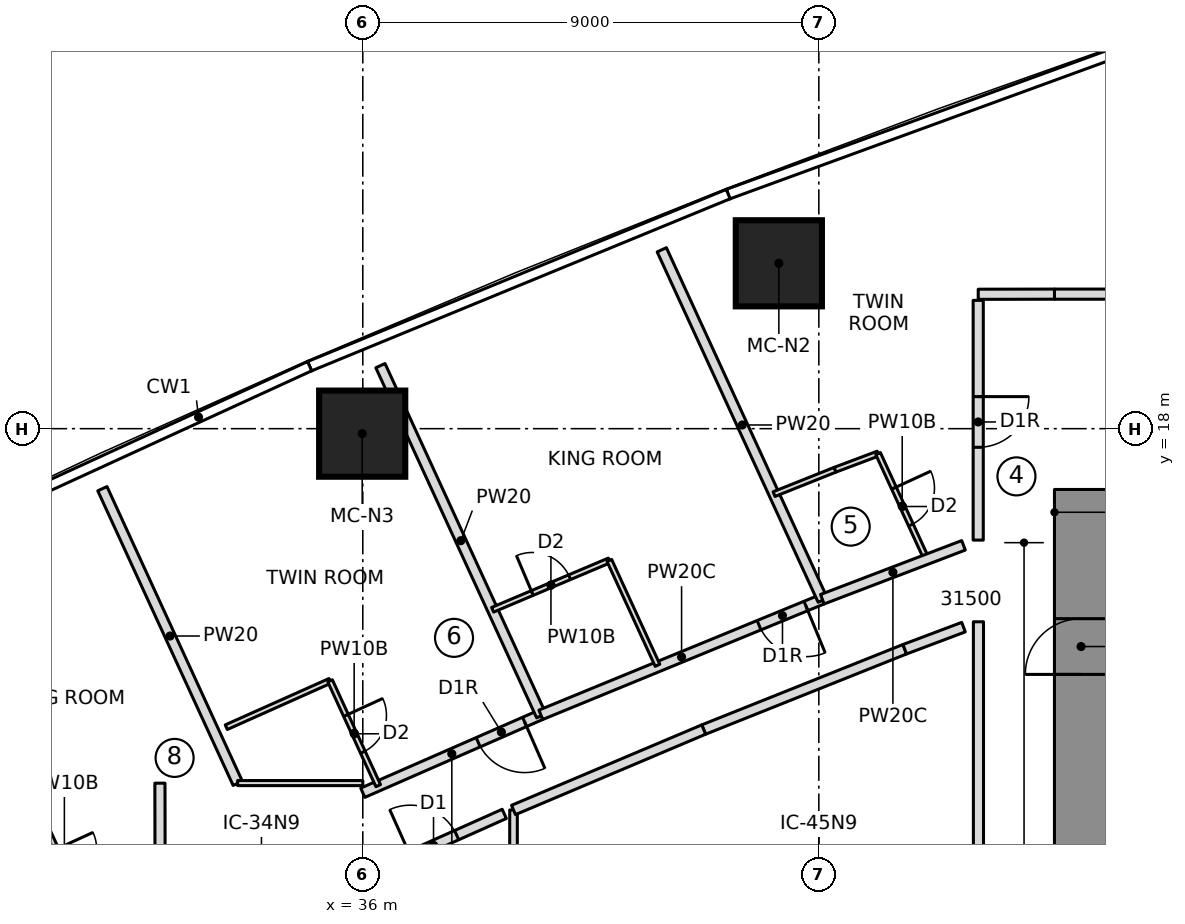
"""IFC4 building model, lengths in metres.
Left out: names, types, materials, properties, quantities, classifications, styles, units other than length and angle.
Written with IfcOpenShell. Run it as: python <this file> out.ifc"""

import sys

from ifc_helpers import new_model, si_unit, direction, frame, frame_2d, origin, origin_2d, place, context, subcontext, project, spatial, rectangle, extrude, element, fill, save


model = new_model("IFC4")
c1 = context("Model", 3, precision=1e-05, world=origin(), true_north=direction((0.0, 1.0)))
c2 = subcontext(c1, "Body", "Model", "MODEL_VIEW")
j1 = project(units=[si_unit("LENGTHUNIT", "METRE"), si_unit("PLANEANGLEUNIT", "RADIAN")], contexts=[c1])
p1 = place(None, origin())
s1 = spatial("IfcSite", under=j1, at=p1, CompositionType="ELEMENT")
p2 = place(p1, origin())
s2 = spatial("IfcBuilding", under=s1, at=p2, CompositionType="ELEMENT")
p3 = place(p2, frame((0.0, 0.0, 102.65)))
s3 = spatial("IfcBuildingStorey", under=s2, at=p3, CompositionType="ELEMENT", Elevation=102.65)
p4 = place(p3, frame((50.175, 6.65, 0.0), z_axis=(0.0, 0.0, 1.0), x_axis=(0.0, 1.0, 0.0)))
e1 = element("IfcWall", 1, at=p4, inside=s3, PredefinedType="SHEAR", context=c2, shape_type="SweptSolid", body=[
    extrude(rectangle(XDim=10.15, YDim=1.05, at=frame_2d((5.075, 0.0))), origin(), (0.0, 0.0, 1.0), 3.55),
])
p5 = place(p4, frame((6.5, 0.0, 0.0)))
e2 = element("IfcOpeningElement", 2, at=p5, cuts=e1, PredefinedType="OPENING", context=c2, shape_type="SweptSolid", body=[
    extrude(rectangle(XDim=1.1, YDim=2.1, at=frame_2d((0.55, 1.05))), frame((0.0, 0.535, 0.0), z_axis=(0.0, -1.0, 0.0), x_axis=(1.0, 0.0, 0.0)), (0.0, 0.0, 1.0), 1.07),
])
for number, where, z_axis, x_axis in (
    (3, (44.211, 21.264, 0.0), (0.0, 0.0, 1.0), (1.0, 0.0, 0.0)),
    (4, (35.988, 17.902, 0.0), (0.0, 0.0, 1.0), (1.0, 0.0, 0.0)),
):
    element("IfcColumn", number, at=place(p3, frame(where, z_axis=z_axis, x_axis=x_axis)), inside=s3, PredefinedType="COLUMN", context=c2, shape_type="SweptSolid", body=[
        extrude(rectangle(XDim=1.7, YDim=1.7, at=origin_2d()), origin(), (0.0, 0.0, 1.0), 3.55),
    ])
p6 = place(p3, frame((29.635, 10.38, 0.0), z_axis=(0.0, 0.0, 1.0), x_axis=(0.417466676952, -0.908692232626, 0.0)))
e5 = element("IfcWall", 5, at=p6, inside=s3, PredefinedType="PARTITIONING", context=c2, shape_type="SweptSolid", body=[
    extrude(rectangle(XDim=2.277, YDim=0.1, at=frame_2d((1.139, 0.0))), origin(), (0.0, 0.0, 1.0), 3.25),
])
p7 = place(p6, frame((0.75, 0.0, 0.0)))
e6 = element("IfcOpeningElement", 6, at=p7, cuts=e5, PredefinedType="OPENING", context=c2, shape_type="SweptSolid", body=[
    extrude(rectangle(XDim=0.8, YDim=2.1, at=frame_2d((0.4, 1.05))), frame((0.0, 0.06, 0.0), z_axis=(0.0, -1.0, 0.0), x_axis=(1.0, 0.0, 0.0)), (0.0, 0.0, 1.0), 0.12),
])
p8 = place(p3, frame((33.532, 11.0, 0.0), z_axis=(0.0, 0.0, 1.0), x_axis=(-0.417441426461, 0.908703832651, 0.0)))
e7 = element("IfcWall", 7, at=p8, inside=s3, PredefinedType="PARTITIONING", context=c2, shape_type="SweptSolid", body=[
    extrude(rectangle(XDim=6.399, YDim=0.2, at=frame_2d((3.2, 0.0))), origin(), (0.0, 0.0, 1.0), 3.25),
])
p9 = place(p3, frame((39.514, 12.353, 0.0), z_axis=(0.0, 0.0, 1.0), x_axis=(-0.916085742373, -0.400982434305, 0.0)))
e8 = element("IfcWall", 8, at=p9, inside=s3, PredefinedType="PARTITIONING", context=c2, shape_type="SweptSolid", body=[
    extrude(rectangle(XDim=3.836, YDim=0.2, at=frame_2d((1.918, 0.0))), origin(), (0.0, 0.0, 1.0), 3.25),
])
p10 = place(p9, frame((0.35, 0.0, 0.0)))
e9 = element("IfcOpeningElement", 9, at=p10, cuts=e8, PredefinedType="OPENING", context=c2, shape_type="SweptSolid", body=[
    extrude(rectangle(XDim=1.0, YDim=2.1, at=frame_2d((0.5, 1.05))), frame((0.0, 0.11, 0.0), z_axis=(0.0, -1.0, 0.0), x_axis=(1.0, 0.0, 0.0)), (0.0, 0.0, 1.0), 0.22),
])
p11 = place(p3, frame((33.306, 12.108, 0.0), z_axis=(0.0, 0.0, 1.0), x_axis=(0.913060453705, 0.407824236504, 0.0)))
e10 = element("IfcWall", 10, at=p11, inside=s3, PredefinedType="PARTITIONING", context=c2, shape_type="SweptSolid", body=[
    extrude(rectangle(XDim=2.243, YDim=0.1, at=frame_2d((1.122, 0.0))), origin(), (0.0, 0.0, 1.0), 3.25),
])
p12 = place(p3, frame((35.354, 13.023, 0.0), z_axis=(0.0, 0.0, 1.0), x_axis=(0.41750734959, -0.908673545911, 0.0)))
e11 = element("IfcWall", 11, at=p12, inside=s3, PredefinedType="PARTITIONING", context=c2, shape_type="SweptSolid", body=[
    extrude(rectangle(XDim=2.277, YDim=0.1, at=frame_2d((1.139, 0.0))), origin(), (0.0, 0.0, 1.0), 3.25),
])
p13 = place(p12, frame((0.75, 0.0, 0.0)))
e12 = element("IfcOpeningElement", 12, at=p13, cuts=e11, PredefinedType="OPENING", context=c2, shape_type="SweptSolid", body=[
    extrude(rectangle(XDim=0.8, YDim=2.1, at=frame_2d((0.4, 1.05))), frame((0.0, 0.06, 0.0), z_axis=(0.0, -1.0, 0.0), x_axis=(1.0, 0.0, 0.0)), (0.0, 0.0, 1.0), 0.12),
])
p14 = place(p3, frame((39.522, 12.334, 0.0), z_axis=(0.0, 0.0, 1.0), x_axis=(-0.417442847913, 0.908703179661, 0.0)))
e13 = element("IfcWall", 13, at=p14, inside=s3, PredefinedType="PARTITIONING", context=c2, shape_type="SweptSolid", body=[
    extrude(rectangle(XDim=7.604, YDim=0.2, at=frame_2d((3.802, 0.0))), origin(), (0.0, 0.0, 1.0), 3.25),
])
p15 = place(p3, frame((45.069, 14.634, 0.0), z_axis=(0.0, 0.0, 1.0), x_axis=(-0.925062421694, -0.379815107611, 0.0)))
e14 = element("IfcWall", 14, at=p15, inside=s3, PredefinedType="PARTITIONING", context=c2, shape_type="SweptSolid", body=[
    extrude(rectangle(XDim=6.005, YDim=0.2, at=frame_2d((3.002, 0.0))), origin(), (0.0, 0.0, 1.0), 3.25),
])
p16 = place(p15, frame((0.35, 0.0, 0.0)))
e15 = element("IfcOpeningElement", 15, at=p16, cuts=e14, PredefinedType="OPENING", context=c2, shape_type="SweptSolid", body=[
    extrude(rectangle(XDim=1.0, YDim=2.1, at=frame_2d((0.5, 1.05))), frame((0.0, 0.11, 0.0), z_axis=(0.0, -1.0, 0.0), x_axis=(1.0, 0.0, 0.0)), (0.0, 0.0, 1.0), 0.22),
])
p17 = place(p3, frame((38.562, 14.426, 0.0), z_axis=(0.0, 0.0, 1.0), x_axis=(0.921042675983, 0.38946166566, 0.0)))
e16 = element("IfcWall", 16, at=p17, inside=s3, PredefinedType="PARTITIONING", context=c2, shape_type="SweptSolid", body=[
    extrude(rectangle(XDim=2.501, YDim=0.1, at=frame_2d((1.25, 0.0))), origin(), (0.0, 0.0, 1.0), 3.25),
])
p18 = place(p17, frame((0.85, 0.0, 0.0)))
e17 = element("IfcOpeningElement", 17, at=p18, cuts=e16, PredefinedType="OPENING", context=c2, shape_type="SweptSolid", body=[
    extrude(rectangle(XDim=0.8, YDim=2.1, at=frame_2d((0.4, 1.05))), frame((0.0, 0.06, 0.0), z_axis=(0.0, -1.0, 0.0), x_axis=(1.0, 0.0, 0.0)), (0.0, 0.0, 1.0), 0.12),
])
p19 = place(p3, frame((40.865, 15.4, 0.0), z_axis=(0.0, 0.0, 1.0), x_axis=(0.417433204355, -0.908707609686, 0.0)))
e18 = element("IfcWall", 18, at=p19, inside=s3, PredefinedType="PARTITIONING", context=c2, shape_type="SweptSolid", body=[
    extrude(rectangle(XDim=2.278, YDim=0.1, at=frame_2d((1.139, 0.0))), origin(), (0.0, 0.0, 1.0), 3.25),
])
p20 = place(p3, frame((45.077, 14.615, 0.0), z_axis=(0.0, 0.0, 1.0), x_axis=(-0.417427858403, 0.908710065438, 0.0)))
e19 = element("IfcWall", 19, at=p20, inside=s3, PredefinedType="PARTITIONING", context=c2, shape_type="SweptSolid", body=[
    extrude(rectangle(XDim=7.61, YDim=0.2, at=frame_2d((3.805, 0.0))), origin(), (0.0, 0.0, 1.0), 3.25),
])
p21 = place(p3, frame((44.116, 16.708, 0.0), z_axis=(0.0, 0.0, 1.0), x_axis=(0.928593389657, 0.371098796393, 0.0)))
e20 = element("IfcWall", 20, at=p21, inside=s3, PredefinedType="PARTITIONING", context=c2, shape_type="SweptSolid", body=[
    extrude(rectangle(XDim=1.298, YDim=0.1, at=frame_2d((0.649, 0.0))), origin(), (0.0, 0.0, 1.0), 3.25),
])
p22 = place(p3, frame((45.321, 17.19, 0.0), z_axis=(0.0, 0.0, 1.0), x_axis=(0.935885332459, 0.352304760808, 0.0)))
e21 = element("IfcWall", 21, at=p22, inside=s3, PredefinedType="PARTITIONING", context=c2, shape_type="SweptSolid", body=[
    extrude(rectangle(XDim=0.906, YDim=0.1, at=frame_2d((0.453, 0.0))), origin(), (0.0, 0.0, 1.0), 3.25),
])
p23 = place(p3, frame((46.169, 17.509, 0.0), z_axis=(0.0, 0.0, 1.0), x_axis=(0.417409478396, -0.90871850831, 0.0)))
e22 = element("IfcWall", 22, at=p23, inside=s3, PredefinedType="PARTITIONING", context=c2, shape_type="SweptSolid", body=[
    extrude(rectangle(XDim=2.283, YDim=0.1, at=frame_2d((1.142, 0.0))), origin(), (0.0, 0.0, 1.0), 3.25),
])
p24 = place(p23, frame((0.75, 0.0, 0.0)))
e23 = element("IfcOpeningElement", 23, at=p24, cuts=e22, PredefinedType="OPENING", context=c2, shape_type="SweptSolid", body=[
    extrude(rectangle(XDim=0.8, YDim=2.1, at=frame_2d((0.4, 1.05))), frame((0.0, 0.06, 0.0), z_axis=(0.0, -1.0, 0.0), x_axis=(1.0, 0.0, 0.0)), (0.0, 0.0, 1.0), 0.12),
])
p25 = place(p3, frame((36.0, 9.15, 0.0), z_axis=(0.0, 0.0, 1.0), x_axis=(0.913029587861, 0.407893333716, 0.0)))
e24 = element("IfcWall", 24, at=p25, inside=s3, PredefinedType="PARTITIONING", context=c2, shape_type="SweptSolid", body=[
    extrude(rectangle(XDim=3.058, YDim=0.2, at=frame_2d((1.529, 0.0))), origin(), (0.0, 0.0, 1.0), 3.25),
])
p26 = place(p25, frame((1.029, 0.0, 0.0)))
e25 = element("IfcOpeningElement", 25, at=p26, cuts=e24, PredefinedType="OPENING", context=c2, shape_type="SweptSolid", body=[
    extrude(rectangle(XDim=1.0, YDim=2.1, at=frame_2d((0.5, 1.05))), frame((0.0, 0.11, 0.0), z_axis=(0.0, -1.0, 0.0), x_axis=(1.0, 0.0, 0.0)), (0.0, 0.0, 1.0), 0.22),
])
p27 = place(p3, frame((38.975, -10.474, 0.0), z_axis=(0.0, 0.0, 1.0), x_axis=(0.0, 1.0, 0.0)))
e26 = element("IfcWall", 26, at=p27, inside=s3, PredefinedType="PARTITIONING", context=c2, shape_type="SweptSolid", body=[
    extrude(rectangle(XDim=20.949, YDim=0.15, at=frame_2d((10.474, 0.0))), origin(), (0.0, 0.0, 1.0), 3.25),
])
p28 = place(p3, frame((42.728, 12.062, 0.0), z_axis=(0.0, 0.0, 1.0), x_axis=(0.928638161177, 0.370986745864, 0.0)))
e27 = element("IfcWall", 27, at=p28, inside=s3, PredefinedType="PARTITIONING", context=c2, shape_type="SweptSolid", body=[
    extrude(rectangle(XDim=4.273, YDim=0.2, at=frame_2d((2.136, 0.0))), origin(), (0.0, 0.0, 1.0), 3.25),
])
p29 = place(p3, frame((38.975, 10.474, 0.0), z_axis=(0.0, 0.0, 1.0), x_axis=(0.921030909625, 0.389489490891, 0.0)))
e28 = element("IfcWall", 28, at=p29, inside=s3, PredefinedType="PARTITIONING", context=c2, shape_type="SweptSolid", body=[
    extrude(rectangle(XDim=4.075, YDim=0.2, at=frame_2d((2.038, 0.0))), origin(), (0.0, 0.0, 1.0), 3.25),
])
p30 = place(p3, frame((54.625, 20.655, 0.0), z_axis=(0.0, 0.0, 1.0), x_axis=(-1.0, 0.0, 0.0)))
e29 = element("IfcWall", 29, at=p30, inside=s3, PredefinedType="PARTITIONING", context=c2, shape_type="SweptSolid", body=[
    extrude(rectangle(XDim=4.976, YDim=0.2, at=frame_2d((2.488, 0.0))), origin(), (0.0, 0.0, 1.0), 3.25),
])
p31 = place(p30, frame((1.988, 0.0, 0.0)))
e30 = element("IfcOpeningElement", 30, at=p31, cuts=e29, PredefinedType="OPENING", context=c2, shape_type="SweptSolid", body=[
    extrude(rectangle(XDim=1.5, YDim=2.1, at=frame_2d((0.75, 1.05))), frame((0.0, 0.11, 0.0), z_axis=(0.0, -1.0, 0.0), x_axis=(1.0, 0.0, 0.0)), (0.0, 0.0, 1.0), 0.22),
])
p32 = place(p3, frame((36.0, 11.005, 0.0), z_axis=(0.0, 0.0, 1.0), x_axis=(-1.0, 0.0, 0.0)))
e31 = element("IfcWall", 31, at=p32, inside=s3, PredefinedType="PARTITIONING", context=c2, shape_type="SweptSolid", body=[
    extrude(rectangle(XDim=2.47, YDim=0.1, at=frame_2d((1.235, 0.0))), origin(), (0.0, 0.0, 1.0), 3.25),
])
p33 = place(p3, frame((47.855, 15.698, 0.0), z_axis=(0.0, 0.0, 1.0), x_axis=(-0.934199537442, -0.35675092746, 0.0)))
e32 = element("IfcWall", 32, at=p33, inside=s3, PredefinedType="PARTITIONING", context=c2, shape_type="SweptSolid", body=[
    extrude(rectangle(XDim=2.982, YDim=0.2, at=frame_2d((1.491, 0.0))), origin(), (0.0, 0.0, 1.0), 3.25),
])
p34 = place(p3, frame((46.696, 13.647, 0.0), z_axis=(0.0, 0.0, 1.0), x_axis=(0.935907269358, 0.352246480696, 0.0)))
e33 = element("IfcWall", 33, at=p34, inside=s3, PredefinedType="PARTITIONING", context=c2, shape_type="SweptSolid", body=[
    extrude(rectangle(XDim=1.239, YDim=0.2, at=frame_2d((0.619, 0.0))), origin(), (0.0, 0.0, 1.0), 3.25),
])
p35 = place(p3, frame((48.15, 14.189, 0.0), z_axis=(0.0, 0.0, 1.0), x_axis=(0.0, -1.0, 0.0)))
e34 = element("IfcWall", 34, at=p35, inside=s3, PredefinedType="PARTITIONING", context=c2, shape_type="SweptSolid", body=[
    extrude(rectangle(XDim=28.377, YDim=0.2, at=frame_2d((14.189, 0.0))), origin(), (0.0, 0.0, 1.0), 3.25),
])
p36 = place(p3, frame((31.997, 11.003, 0.0), z_axis=(0.0, 0.0, 1.0), x_axis=(0.001683296882, -0.999998583255, 0.0)))
e35 = element("IfcWall", 35, at=p36, inside=s3, PredefinedType="PARTITIONING", context=c2, shape_type="SweptSolid", body=[
    extrude(rectangle(XDim=2.031, YDim=0.2, at=frame_2d((1.015, 0.0))), origin(), (0.0, 0.0, 1.0), 3.25),
])
p37 = place(p3, frame((49.65, 20.655, 0.0), z_axis=(0.0, 0.0, 1.0), x_axis=(-0.999998406651, -0.001785131852, 0.0)))
e36 = element("IfcWall", 36, at=p37, inside=s3, PredefinedType="PARTITIONING", context=c2, shape_type="SweptSolid", body=[
    extrude(rectangle(XDim=1.504, YDim=0.2, at=frame_2d((0.752, 0.0))), origin(), (0.0, 0.0, 1.0), 3.25),
])
p38 = place(p3, frame((48.146, 20.532, 0.0), z_axis=(0.0, 0.0, 1.0), x_axis=(-5.1594263e-05, -0.999999998669, 0.0)))
e37 = element("IfcWall", 37, at=p38, inside=s3, PredefinedType="PARTITIONING", context=c2, shape_type="SweptSolid", body=[
    extrude(rectangle(XDim=4.732, YDim=0.2, at=frame_2d((2.366, 0.0))), origin(), (0.0, 0.0, 1.0), 3.25),
])
p39 = place(p38, frame((1.9, 0.0, 0.0)))
e38 = element("IfcOpeningElement", 38, at=p39, cuts=e37, PredefinedType="OPENING", context=c2, shape_type="SweptSolid", body=[
    extrude(rectangle(XDim=1.0, YDim=2.1, at=frame_2d((0.5, 1.05))), frame((0.0, 0.11, 0.0), z_axis=(0.0, -1.0, 0.0), x_axis=(1.0, 0.0, 0.0)), (0.0, 0.0, 1.0), 0.22),
])
p40 = place(p13, origin())
e39 = element("IfcDoor", 39, at=p40, inside=s3, OperationType="SINGLE_SWING_LEFT", PredefinedType="DOOR", context=c2, shape_type="SweptSolid", body=[
    extrude(rectangle(XDim=0.8, YDim=2.1, at=frame_2d((0.4, 1.05))), frame((0.0, 0.025, 0.0), z_axis=(0.0, -1.0, 0.0), x_axis=(1.0, 0.0, 0.0)), (0.0, 0.0, 1.0), 0.05),
])
fill(e12, e39)
p41 = place(p10, origin())
e40 = element("IfcDoor", 40, at=p41, inside=s3, OperationType="SINGLE_SWING_RIGHT", PredefinedType="DOOR", context=c2, shape_type="SweptSolid", body=[
    extrude(rectangle(XDim=1.0, YDim=2.1, at=frame_2d((0.5, 1.05))), frame((0.0, 0.025, 0.0), z_axis=(0.0, -1.0, 0.0), x_axis=(1.0, 0.0, 0.0)), (0.0, 0.0, 1.0), 0.05),
])
fill(e9, e40)
p42 = place(p18, origin())
e41 = element("IfcDoor", 41, at=p42, inside=s3, OperationType="SINGLE_SWING_LEFT", PredefinedType="DOOR", context=c2, shape_type="SweptSolid", body=[
    extrude(rectangle(XDim=0.8, YDim=2.1, at=frame_2d((0.4, 1.05))), frame((0.0, 0.025, 0.0), z_axis=(0.0, -1.0, 0.0), x_axis=(1.0, 0.0, 0.0)), (0.0, 0.0, 1.0), 0.05),
])
fill(e17, e41)
p43 = place(p16, origin())
e42 = element("IfcDoor", 42, at=p43, inside=s3, OperationType="SINGLE_SWING_RIGHT", PredefinedType="DOOR", context=c2, shape_type="SweptSolid", body=[
    extrude(rectangle(XDim=1.0, YDim=2.1, at=frame_2d((0.5, 1.05))), frame((0.0, 0.025, 0.0), z_axis=(0.0, -1.0, 0.0), x_axis=(1.0, 0.0, 0.0)), (0.0, 0.0, 1.0), 0.05),
])
fill(e15, e42)
p44 = place(p24, origin())
e43 = element("IfcDoor", 43, at=p44, inside=s3, OperationType="SINGLE_SWING_LEFT", PredefinedType="DOOR", context=c2, shape_type="SweptSolid", body=[
    extrude(rectangle(XDim=0.8, YDim=2.1, at=frame_2d((0.4, 1.05))), frame((0.0, 0.025, 0.0), z_axis=(0.0, -1.0, 0.0), x_axis=(1.0, 0.0, 0.0)), (0.0, 0.0, 1.0), 0.05),
])
fill(e23, e43)
p45 = place(p26, origin())
e44 = element("IfcDoor", 44, at=p45, inside=s3, OperationType="SINGLE_SWING_LEFT", PredefinedType="DOOR", context=c2, shape_type="SweptSolid", body=[
    extrude(rectangle(XDim=1.0, YDim=2.1, at=frame_2d((0.5, 1.05))), frame((0.0, 0.025, 0.0), z_axis=(0.0, -1.0, 0.0), x_axis=(1.0, 0.0, 0.0)), (0.0, 0.0, 1.0), 0.05),
])
fill(e25, e44)
p46 = place(p39, origin())
e45 = element("IfcDoor", 45, at=p46, inside=s3, OperationType="SINGLE_SWING_RIGHT", PredefinedType="DOOR", context=c2, shape_type="SweptSolid", body=[
    extrude(rectangle(XDim=1.0, YDim=2.1, at=frame_2d((0.5, 1.05))), frame((0.0, 0.025, 0.0), z_axis=(0.0, -1.0, 0.0), x_axis=(1.0, 0.0, 0.0)), (0.0, 0.0, 1.0), 0.05),
])
fill(e38, e45)
p47 = place(p5, origin())
e46 = element("IfcDoor", 46, at=p47, inside=s3, OperationType="SINGLE_SWING_RIGHT", PredefinedType="DOOR", context=c2, shape_type="SweptSolid", body=[
    extrude(rectangle(XDim=1.1, YDim=2.1, at=frame_2d((0.55, 1.05))), frame((0.0, 0.025, 0.0), z_axis=(0.0, -1.0, 0.0), x_axis=(1.0, 0.0, 0.0)), (0.0, 0.0, 1.0), 0.05),
])
fill(e2, e46)
save(model, sys.argv[1])
